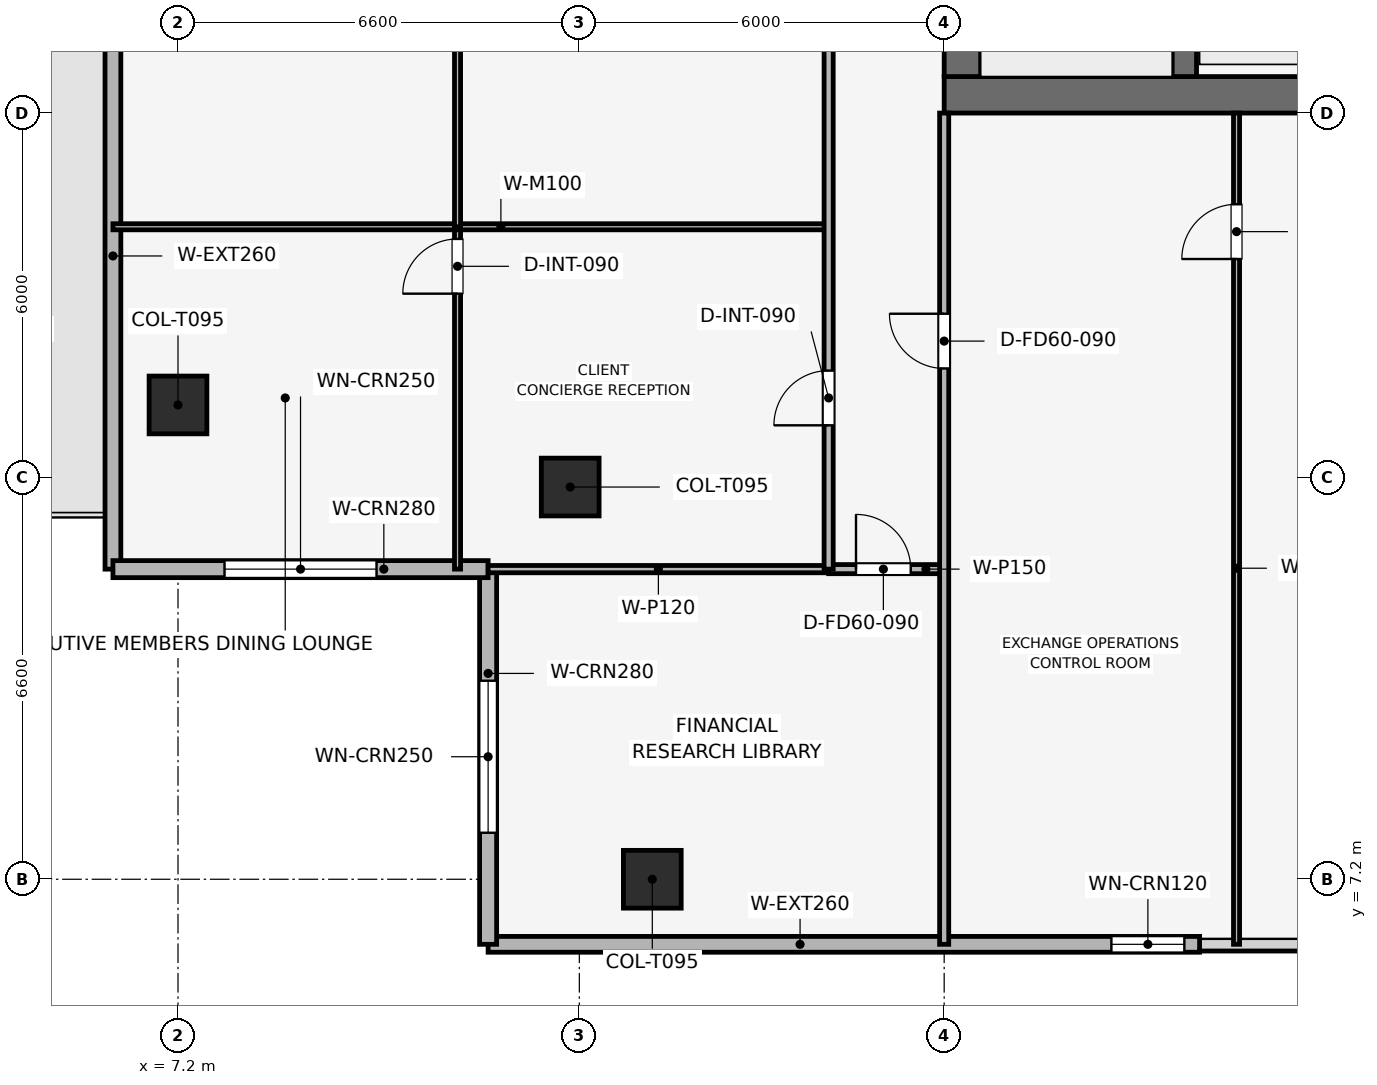
"""IFC4 building model, lengths in metres.
Left out: names, types, materials, properties, quantities, classifications, styles, units other than length and angle.
Written with IfcOpenShell. Run it as: python <this file> out.ifc"""

import sys

from ifc_helpers import new_model, si_unit, direction, frame, frame_2d, origin, origin_2d, place, context, subcontext, project, spatial, rectangle, extrude, element, fill, save


model = new_model("IFC4")
c1 = context("Model", 3, precision=1e-05, world=origin(), true_north=direction((0.0, 1.0)))
c2 = subcontext(c1, "Body", "Model", "MODEL_VIEW")
j1 = project(units=[si_unit("LENGTHUNIT", "METRE"), si_unit("PLANEANGLEUNIT", "RADIAN")], contexts=[c1])
p1 = place(None, origin())
s1 = spatial("IfcSite", under=j1, at=p1, CompositionType="ELEMENT")
p2 = place(p1, origin())
s2 = spatial("IfcBuilding", under=s1, at=p2, CompositionType="ELEMENT")
p3 = place(p2, frame((0.0, 0.0, 329.25)))
s3 = spatial("IfcBuildingStorey", under=s2, at=p3, CompositionType="ELEMENT", Elevation=329.25)
p4 = place(p3, frame((19.8, 20.1, 0.0), z_axis=(0.0, 0.0, 1.0), x_axis=(1.0, 0.0, 0.0)))
e1 = element("IfcWall", 1, at=p4, inside=s3, PredefinedType="SHEAR", context=c2, shape_type="SweptSolid", body=[
    extrude(rectangle(XDim=18.0, YDim=0.6, at=frame_2d((9.0, 0.0))), origin(), (0.0, 0.0, 1.0), 3.75),
])
p5 = place(p3, frame((20.1, 20.4, 0.0), z_axis=(0.0, 0.0, 1.0), x_axis=(0.0, 1.0, 0.0)))
e2 = element("IfcWall", 2, at=p5, inside=s3, PredefinedType="SHEAR", context=c2, shape_type="SweptSolid", body=[
    extrude(rectangle(XDim=16.8, YDim=0.6, at=frame_2d((8.4, 0.0))), origin(), (0.0, 0.0, 1.0), 3.75),
])
p6 = place(p5, frame((10.4, 0.0, 0.0)))
e3 = element("IfcOpeningElement", 3, at=p6, cuts=e2, PredefinedType="OPENING", context=c2, shape_type="SweptSolid", body=[
    extrude(rectangle(XDim=1.1, YDim=2.15, at=frame_2d((0.55, 1.075))), frame((0.0, 0.31, 0.0), z_axis=(0.0, -1.0, 0.0), x_axis=(1.0, 0.0, 0.0)), (0.0, 0.0, 1.0), 0.62),
])
p7 = place(p3, frame((23.75, 20.4, 0.0), z_axis=(0.0, 0.0, 1.0), x_axis=(0.0, 1.0, 0.0)))
e4 = element("IfcWall", 4, at=p7, inside=s3, PredefinedType="SHEAR", context=c2, shape_type="SweptSolid", body=[
    extrude(rectangle(XDim=16.8, YDim=0.4, at=frame_2d((8.4, 0.0))), origin(), (0.0, 0.0, 1.0), 3.75),
])
for number, where, z_axis, x_axis in (
    (5, (15.0, 7.2, 0.003), (0.0, 0.158, 0.987), (-1.0, 0.0, 0.0)),
    (6, (7.2, 15.0, 0.003), (0.158, 0.0, 0.987), (0.0, 1.0, 0.0)),
):
    element("IfcColumn", number, at=place(p3, frame(where, z_axis=z_axis, x_axis=x_axis)), inside=s3, PredefinedType="COLUMN", context=c2, shape_type="SweptSolid", body=[
        extrude(rectangle(XDim=0.95, YDim=0.95, at=origin_2d()), origin(), (0.0, 0.0, 1.0), 3.549),
    ])
p8 = place(p3, frame((13.65, 13.65, 0.003), z_axis=(0.079681515195, 0.079681515195, 0.993630571325), x_axis=(-0.707106781187, 0.707106781187, 0.0)))
e7 = element("IfcColumn", 7, at=p8, inside=s3, PredefinedType="COLUMN", context=c2, shape_type="SweptSolid", body=[
    extrude(rectangle(XDim=0.95, YDim=0.95, at=origin_2d()), origin(), (0.0, 0.0, 1.0), 3.527),
])
p9 = place(p3, frame((24.0, 6.13, 0.0), z_axis=(0.0, 0.0, 1.0), x_axis=(-1.0, 0.0, 0.0)))
e8 = element("IfcWall", 8, at=p9, inside=s3, PredefinedType="SOLIDWALL", context=c2, shape_type="SweptSolid", body=[
    extrude(rectangle(XDim=11.7, YDim=0.26, at=frame_2d((5.85, 0.0))), origin(), (0.0, 0.0, 1.0), 3.51),
])
p10 = place(p9, frame((0.25, 0.0, 0.9)))
e9 = element("IfcOpeningElement", 9, at=p10, cuts=e8, PredefinedType="OPENING", context=c2, shape_type="SweptSolid", body=[
    extrude(rectangle(XDim=1.2, YDim=2.1, at=frame_2d((0.6, 1.05))), frame((0.0, 0.14, 0.0), z_axis=(0.0, -1.0, 0.0), x_axis=(1.0, 0.0, 0.0)), (0.0, 0.0, 1.0), 0.28),
])
p11 = place(p3, frame((6.13, 12.3, 0.0), z_axis=(0.0, 0.0, 1.0), x_axis=(0.0, 1.0, 0.0)))
e10 = element("IfcWall", 10, at=p11, inside=s3, PredefinedType="SOLIDWALL", context=c2, shape_type="SweptSolid", body=[
    extrude(rectangle(XDim=11.7, YDim=0.26, at=frame_2d((5.85, 0.0))), origin(), (0.0, 0.0, 1.0), 3.51),
])
p12 = place(p11, frame((10.45, 0.0, 0.0)))
e11 = element("IfcOpeningElement", 11, at=p12, cuts=e10, PredefinedType="OPENING", context=c2, shape_type="SweptSolid", body=[
    extrude(rectangle(XDim=1.0, YDim=2.2, at=frame_2d((0.5, 1.1))), frame((0.0, 0.14, 0.0), z_axis=(0.0, -1.0, 0.0), x_axis=(1.0, 0.0, 0.0)), (0.0, 0.0, 1.0), 0.28),
])
p13 = place(p3, frame((12.3, 6.13, 0.0), z_axis=(0.0, 0.0, 1.0), x_axis=(0.0, 1.0, 0.0)))
e12 = element("IfcWall", 12, at=p13, inside=s3, PredefinedType="SOLIDWALL", context=c2, shape_type="SweptSolid", body=[
    extrude(rectangle(XDim=6.17, YDim=0.28, at=frame_2d((3.085, 0.0))), origin(), (0.0, 0.0, 1.0), 3.51),
])
p14 = place(p13, frame((1.835, 0.0, 0.9)))
e13 = element("IfcOpeningElement", 13, at=p14, cuts=e12, PredefinedType="OPENING", context=c2, shape_type="SweptSolid", body=[
    extrude(rectangle(XDim=2.5, YDim=1.9, at=frame_2d((1.25, 0.95))), frame((0.0, 0.15, 0.0), z_axis=(0.0, -1.0, 0.0), x_axis=(1.0, 0.0, 0.0)), (0.0, 0.0, 1.0), 0.3),
])
p15 = place(p3, frame((12.3, 12.3, 0.0), z_axis=(0.0, 0.0, 1.0), x_axis=(-1.0, 0.0, 0.0)))
e14 = element("IfcWall", 14, at=p15, inside=s3, PredefinedType="SOLIDWALL", context=c2, shape_type="SweptSolid", body=[
    extrude(rectangle(XDim=6.17, YDim=0.28, at=frame_2d((3.085, 0.0))), origin(), (0.0, 0.0, 1.0), 3.51),
])
p16 = place(p15, frame((1.835, 0.0, 0.9)))
e15 = element("IfcOpeningElement", 15, at=p16, cuts=e14, PredefinedType="OPENING", context=c2, shape_type="SweptSolid", body=[
    extrude(rectangle(XDim=2.5, YDim=1.9, at=frame_2d((1.25, 0.95))), frame((0.0, 0.15, 0.0), z_axis=(0.0, -1.0, 0.0), x_axis=(1.0, 0.0, 0.0)), (0.0, 0.0, 1.0), 0.3),
])
p17 = place(p3, frame((11.797, 12.3, 0.0), z_axis=(0.0, 0.0, 1.0), x_axis=(0.0, 1.0, 0.0)))
e16 = element("IfcWall", 16, at=p17, inside=s3, PredefinedType="MOVABLE", context=c2, shape_type="SweptSolid", body=[
    extrude(rectangle(XDim=5.63, YDim=0.1, at=frame_2d((2.815, 0.0))), origin(), (0.0, 0.0, 1.0), 3.195),
])
p18 = place(p17, frame((4.53, 0.0, 0.0)))
e17 = element("IfcOpeningElement", 17, at=p18, cuts=e16, PredefinedType="OPENING", context=c2, shape_type="SweptSolid", body=[
    extrude(rectangle(XDim=0.9, YDim=2.1, at=frame_2d((0.45, 1.05))), frame((0.0, 0.06, 0.0), z_axis=(0.0, -1.0, 0.0), x_axis=(1.0, 0.0, 0.0)), (0.0, 0.0, 1.0), 0.12),
])
p19 = place(p3, frame((6.13, 17.93, 0.0), z_axis=(0.0, 0.0, 1.0), x_axis=(1.0, 0.0, 0.0)))
e18 = element("IfcWall", 18, at=p19, inside=s3, PredefinedType="MOVABLE", context=c2, shape_type="SweptSolid", body=[
    extrude(rectangle(XDim=11.77, YDim=0.1, at=frame_2d((5.885, 0.0))), origin(), (0.0, 0.0, 1.0), 3.095),
])
p20 = place(p3, frame((11.797, 17.93, 0.0), z_axis=(0.0, 0.0, 1.0), x_axis=(0.0, 1.0, 0.0)))
e19 = element("IfcWall", 19, at=p20, inside=s3, PredefinedType="MOVABLE", context=c2, shape_type="SweptSolid", body=[
    extrude(rectangle(XDim=10.07, YDim=0.1, at=frame_2d((5.035, 0.0))), origin(), (0.0, 0.0, 1.0), 3.095),
])
p21 = place(p20, frame((3.489, 0.0, 0.0)))
e20 = element("IfcOpeningElement", 20, at=p21, cuts=e19, PredefinedType="OPENING", context=c2, shape_type="SweptSolid", body=[
    extrude(rectangle(XDim=0.9, YDim=2.1, at=frame_2d((0.45, 1.05))), frame((0.0, 0.06, 0.0), z_axis=(0.0, -1.0, 0.0), x_axis=(1.0, 0.0, 0.0)), (0.0, 0.0, 1.0), 0.12),
])
p22 = place(p3, frame((12.3, 12.3, 0.0), z_axis=(0.0, 0.0, 1.0), x_axis=(1.0, 0.0, 0.0)))
e21 = element("IfcWall", 21, at=p22, inside=s3, PredefinedType="PARTITIONING", context=c2, shape_type="SweptSolid", body=[
    extrude(rectangle(XDim=5.6, YDim=0.12, at=frame_2d((2.8, 0.0))), origin(), (0.0, 0.0, 1.0), 3.195),
])
p23 = place(p3, frame((17.9, 12.3, 0.0), z_axis=(0.0, 0.0, 1.0), x_axis=(1.0, 0.0, 0.0)))
e22 = element("IfcWall", 22, at=p23, inside=s3, PredefinedType="PARTITIONING", context=c2, shape_type="SweptSolid", body=[
    extrude(rectangle(XDim=1.9, YDim=0.15, at=frame_2d((0.95, 0.0))), origin(), (0.0, 0.0, 1.0), 3.51),
])
p24 = place(p23, frame((0.45, 0.0, 0.0)))
e23 = element("IfcOpeningElement", 23, at=p24, cuts=e22, PredefinedType="OPENING", context=c2, shape_type="SweptSolid", body=[
    extrude(rectangle(XDim=0.9, YDim=2.1, at=frame_2d((0.45, 1.05))), frame((0.0, 0.085, 0.0), z_axis=(0.0, -1.0, 0.0), x_axis=(1.0, 0.0, 0.0)), (0.0, 0.0, 1.0), 0.17),
])
p25 = place(p3, frame((19.8, 6.13, 0.0), z_axis=(0.0, 0.0, 1.0), x_axis=(0.0, 1.0, 0.0)))
e24 = element("IfcWall", 24, at=p25, inside=s3, PredefinedType="PARTITIONING", context=c2, shape_type="SweptSolid", body=[
    extrude(rectangle(XDim=13.67, YDim=0.15, at=frame_2d((6.835, 0.0))), origin(), (0.0, 0.0, 1.0), 3.095),
])
p26 = place(p25, frame((9.47, 0.0, 0.0)))
e25 = element("IfcOpeningElement", 25, at=p26, cuts=e24, PredefinedType="OPENING", context=c2, shape_type="SweptSolid", body=[
    extrude(rectangle(XDim=0.9, YDim=2.1, at=frame_2d((0.45, 1.05))), frame((0.0, 0.085, 0.0), z_axis=(0.0, -1.0, 0.0), x_axis=(1.0, 0.0, 0.0)), (0.0, 0.0, 1.0), 0.17),
])
p27 = place(p3, frame((24.608, 6.13, 0.0), z_axis=(0.0, 0.0, 1.0), x_axis=(0.0, 1.0, 0.0)))
e26 = element("IfcWall", 26, at=p27, inside=s3, PredefinedType="MOVABLE", context=c2, shape_type="SweptSolid", body=[
    extrude(rectangle(XDim=13.67, YDim=0.1, at=frame_2d((6.835, 0.0))), origin(), (0.0, 0.0, 1.0), 3.135),
])
p28 = place(p27, frame((11.27, 0.0, 0.0)))
e27 = element("IfcOpeningElement", 27, at=p28, cuts=e26, PredefinedType="OPENING", context=c2, shape_type="SweptSolid", body=[
    extrude(rectangle(XDim=0.9, YDim=2.1, at=frame_2d((0.45, 1.05))), frame((0.0, 0.06, 0.0), z_axis=(0.0, -1.0, 0.0), x_axis=(1.0, 0.0, 0.0)), (0.0, 0.0, 1.0), 0.12),
])
p29 = place(p3, frame((17.9, 12.3, 0.0), z_axis=(0.0, 0.0, 1.0), x_axis=(0.0, 1.0, 0.0)))
e28 = element("IfcWall", 28, at=p29, inside=s3, PredefinedType="PARTITIONING", context=c2, shape_type="SweptSolid", body=[
    extrude(rectangle(XDim=27.4, YDim=0.15, at=frame_2d((13.7, 0.0))), origin(), (0.0, 0.0, 1.0), 3.095),
])
p30 = place(p29, frame((2.365, 0.0, 0.0)))
e29 = element("IfcOpeningElement", 29, at=p30, cuts=e28, PredefinedType="OPENING", context=c2, shape_type="SweptSolid", body=[
    extrude(rectangle(XDim=0.9, YDim=2.1, at=frame_2d((0.45, 1.05))), frame((0.0, 0.085, 0.0), z_axis=(0.0, -1.0, 0.0), x_axis=(1.0, 0.0, 0.0)), (0.0, 0.0, 1.0), 0.17),
])
p31 = place(p29, frame((10.215, 0.0, 0.0)))
e30 = element("IfcOpeningElement", 30, at=p31, cuts=e28, PredefinedType="OPENING", context=c2, shape_type="SweptSolid", body=[
    extrude(rectangle(XDim=0.9, YDim=2.1, at=frame_2d((0.45, 1.05))), frame((0.0, 0.085, 0.0), z_axis=(0.0, -1.0, 0.0), x_axis=(1.0, 0.0, 0.0)), (0.0, 0.0, 1.0), 0.17),
])
p32 = place(p29, frame((16.65, 0.0, 0.0)))
e31 = element("IfcOpeningElement", 31, at=p32, cuts=e28, PredefinedType="OPENING", context=c2, shape_type="SweptSolid", body=[
    extrude(rectangle(XDim=0.9, YDim=2.1, at=frame_2d((0.45, 1.05))), frame((0.0, 0.085, 0.0), z_axis=(0.0, -1.0, 0.0), x_axis=(1.0, 0.0, 0.0)), (0.0, 0.0, 1.0), 0.17),
])
p33 = place(p29, frame((19.55, 0.0, 0.0)))
e32 = element("IfcOpeningElement", 32, at=p33, cuts=e28, PredefinedType="OPENING", context=c2, shape_type="SweptSolid", body=[
    extrude(rectangle(XDim=0.9, YDim=2.1, at=frame_2d((0.45, 1.05))), frame((0.0, 0.085, 0.0), z_axis=(0.0, -1.0, 0.0), x_axis=(1.0, 0.0, 0.0)), (0.0, 0.0, 1.0), 0.17),
])
p34 = place(p29, frame((22.3, 0.0, 0.0)))
e33 = element("IfcOpeningElement", 33, at=p34, cuts=e28, PredefinedType="OPENING", context=c2, shape_type="SweptSolid", body=[
    extrude(rectangle(XDim=0.95, YDim=2.1, at=frame_2d((0.475, 1.05))), frame((0.0, 0.085, 0.0), z_axis=(0.0, -1.0, 0.0), x_axis=(1.0, 0.0, 0.0)), (0.0, 0.0, 1.0), 0.17),
])
p35 = place(p29, frame((25.3, 0.0, 0.0)))
e34 = element("IfcOpeningElement", 34, at=p35, cuts=e28, PredefinedType="OPENING", context=c2, shape_type="SweptSolid", body=[
    extrude(rectangle(XDim=0.9, YDim=2.1, at=frame_2d((0.45, 1.05))), frame((0.0, 0.085, 0.0), z_axis=(0.0, -1.0, 0.0), x_axis=(1.0, 0.0, 0.0)), (0.0, 0.0, 1.0), 0.17),
])
p36 = place(p10, origin())
e35 = element("IfcWindow", 35, at=p36, inside=s3, PartitioningType="SINGLE_PANEL", PredefinedType="WINDOW", context=c2, shape_type="SweptSolid", body=[
    extrude(rectangle(XDim=1.2, YDim=2.1, at=frame_2d((0.6, 1.05))), frame((0.0, 0.03, 0.0), z_axis=(0.0, -1.0, 0.0), x_axis=(1.0, 0.0, 0.0)), (0.0, 0.0, 1.0), 0.06),
])
fill(e9, e35)
p37 = place(p14, origin())
e36 = element("IfcWindow", 36, at=p37, inside=s3, PartitioningType="SINGLE_PANEL", PredefinedType="WINDOW", context=c2, shape_type="SweptSolid", body=[
    extrude(rectangle(XDim=2.5, YDim=1.9, at=frame_2d((1.25, 0.95))), frame((0.0, 0.03, 0.0), z_axis=(0.0, -1.0, 0.0), x_axis=(1.0, 0.0, 0.0)), (0.0, 0.0, 1.0), 0.06),
])
fill(e13, e36)
p38 = place(p16, origin())
e37 = element("IfcWindow", 37, at=p38, inside=s3, PartitioningType="SINGLE_PANEL", PredefinedType="WINDOW", context=c2, shape_type="SweptSolid", body=[
    extrude(rectangle(XDim=2.5, YDim=1.9, at=frame_2d((1.25, 0.95))), frame((0.0, 0.03, 0.0), z_axis=(0.0, -1.0, 0.0), x_axis=(1.0, 0.0, 0.0)), (0.0, 0.0, 1.0), 0.06),
])
fill(e15, e37)
p39 = place(p18, origin())
e38 = element("IfcDoor", 38, at=p39, inside=s3, OperationType="SINGLE_SWING_LEFT", PredefinedType="DOOR", context=c2, shape_type="SweptSolid", body=[
    extrude(rectangle(XDim=0.9, YDim=2.1, at=frame_2d((0.45, 1.05))), frame((0.0, 0.025, 0.0), z_axis=(0.0, -1.0, 0.0), x_axis=(1.0, 0.0, 0.0)), (0.0, 0.0, 1.0), 0.05),
])
fill(e17, e38)
p40 = place(p24, origin())
e39 = element("IfcDoor", 39, at=p40, inside=s3, OperationType="SINGLE_SWING_LEFT", PredefinedType="DOOR", context=c2, shape_type="SweptSolid", body=[
    extrude(rectangle(XDim=0.9, YDim=2.1, at=frame_2d((0.45, 1.05))), frame((0.0, 0.025, 0.0), z_axis=(0.0, -1.0, 0.0), x_axis=(1.0, 0.0, 0.0)), (0.0, 0.0, 1.0), 0.05),
])
fill(e23, e39)
p41 = place(p26, origin())
e40 = element("IfcDoor", 40, at=p41, inside=s3, OperationType="SINGLE_SWING_RIGHT", PredefinedType="DOOR", context=c2, shape_type="SweptSolid", body=[
    extrude(rectangle(XDim=0.9, YDim=2.1, at=frame_2d((0.45, 1.05))), frame((0.0, 0.025, 0.0), z_axis=(0.0, -1.0, 0.0), x_axis=(1.0, 0.0, 0.0)), (0.0, 0.0, 1.0), 0.05),
])
fill(e25, e40)
p42 = place(p28, origin())
e41 = element("IfcDoor", 41, at=p42, inside=s3, OperationType="SINGLE_SWING_LEFT", PredefinedType="DOOR", context=c2, shape_type="SweptSolid", body=[
    extrude(rectangle(XDim=0.9, YDim=2.1, at=frame_2d((0.45, 1.05))), frame((0.0, 0.025, 0.0), z_axis=(0.0, -1.0, 0.0), x_axis=(1.0, 0.0, 0.0)), (0.0, 0.0, 1.0), 0.05),
])
fill(e27, e41)
p43 = place(p30, origin())
e42 = element("IfcDoor", 42, at=p43, inside=s3, OperationType="SINGLE_SWING_LEFT", PredefinedType="DOOR", context=c2, shape_type="SweptSolid", body=[
    extrude(rectangle(XDim=0.9, YDim=2.1, at=frame_2d((0.45, 1.05))), frame((0.0, 0.025, 0.0), z_axis=(0.0, -1.0, 0.0), x_axis=(1.0, 0.0, 0.0)), (0.0, 0.0, 1.0), 0.05),
])
fill(e29, e42)
save(model, sys.argv[1])
